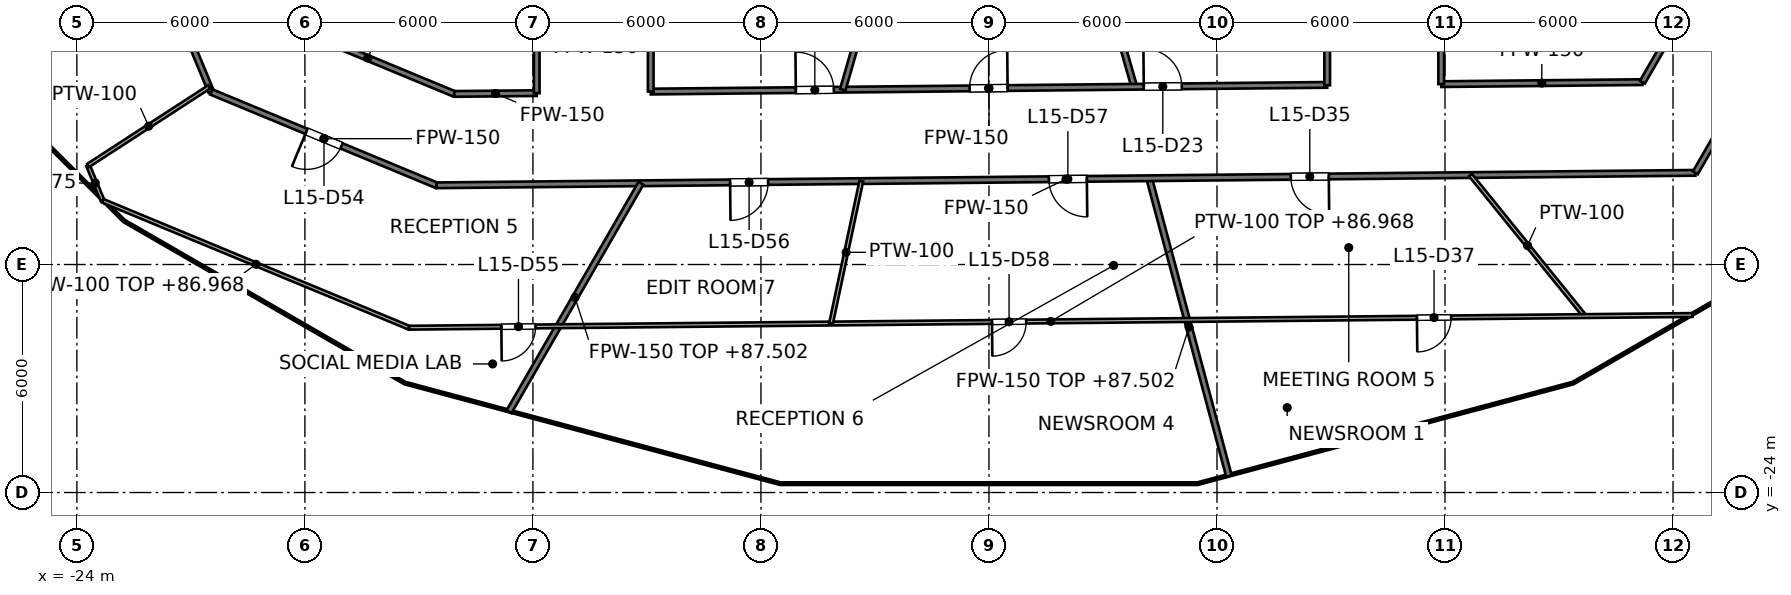
"""IFC4 building model, lengths in metres.
Left out: names, types, materials, properties, quantities, classifications, styles, units other than length and angle.
Written with IfcOpenShell. Run it as: python <this file> out.ifc"""

import sys

from ifc_helpers import new_model, si_unit, direction, frame, frame_2d, origin, place, context, subcontext, project, spatial, rectangle, extrude, element, fill, save


model = new_model("IFC4")
c1 = context("Model", 3, precision=1e-05, world=origin(), true_north=direction((0.0, 1.0)))
c2 = subcontext(c1, "Body", "Model", "MODEL_VIEW")
j1 = project(units=[si_unit("LENGTHUNIT", "METRE"), si_unit("PLANEANGLEUNIT", "RADIAN")], contexts=[c1])
p1 = place(None, origin())
s1 = spatial("IfcSite", under=j1, at=p1, CompositionType="ELEMENT")
p2 = place(p1, origin())
s2 = spatial("IfcBuilding", under=s1, at=p2, CompositionType="ELEMENT")
p3 = place(p2, frame((0.0, 0.0, 84.0)))
s3 = spatial("IfcBuildingStorey", under=s2, at=p3, CompositionType="ELEMENT", Elevation=84.0)
p4 = place(p3, frame((4.215, -15.73, 0.0), z_axis=(0.0, 0.0, 1.0), x_axis=(0.258844392232, -0.96591903419, 0.0)))
e1 = element("IfcWall", 1, at=p4, inside=s3, PredefinedType="PARTITIONING", context=c2, shape_type="SweptSolid", body=[
    extrude(rectangle(XDim=8.112, YDim=0.15, at=frame_2d((4.056, 0.0))), origin(), (0.0, 0.0, 1.0), 3.502),
])
p5 = place(p3, frame((2.296, -8.0, 0.0), z_axis=(0.0, 0.0, 1.0), x_axis=(0.275935525478, -0.961176147113, 0.0)))
e2 = element("IfcWall", 2, at=p5, inside=s3, PredefinedType="PARTITIONING", context=c2, shape_type="SweptSolid", body=[
    extrude(rectangle(XDim=5.548, YDim=0.15, at=frame_2d((2.774, 0.0))), origin(), (0.0, 0.0, 1.0), 3.9),
])
p6 = place(p3, frame((-22.9, -7.572, 0.0), z_axis=(0.0, 0.0, 1.0), x_axis=(0.382367581622, -0.924010298928, 0.0)))
e3 = element("IfcWall", 3, at=p6, inside=s3, PredefinedType="PARTITIONING", context=c2, shape_type="SweptSolid", body=[
    extrude(rectangle(XDim=6.374, YDim=0.15, at=frame_2d((3.187, 0.0))), origin(), (0.0, 0.0, 1.0), 2.977),
])
p7 = place(p6, frame((2.6, 0.0, 0.0)))
e4 = element("IfcOpeningElement", 4, at=p7, cuts=e3, PredefinedType="OPENING", context=c2, shape_type="SweptSolid", body=[
    extrude(rectangle(XDim=1.0, YDim=2.1, at=frame_2d((0.5, 1.05))), frame((0.0, 0.075, 0.0), z_axis=(0.0, -1.0, 0.0), x_axis=(1.0, 0.0, 0.0)), (0.0, 0.0, 1.0), 0.15),
])
p8 = place(p3, frame((-20.46, -13.46, 0.0), z_axis=(0.0, 0.0, 1.0), x_axis=(0.923801547606, -0.382871650349, 0.0)))
e5 = element("IfcWall", 5, at=p8, inside=s3, PredefinedType="PARTITIONING", context=c2, shape_type="SweptSolid", body=[
    extrude(rectangle(XDim=6.415, YDim=0.15, at=frame_2d((3.208, 0.0))), origin(), (0.0, 0.0, 1.0), 2.968),
])
p9 = place(p8, frame((2.707, 0.0, 0.0)))
e6 = element("IfcOpeningElement", 6, at=p9, cuts=e5, PredefinedType="OPENING", context=c2, shape_type="SweptSolid", body=[
    extrude(rectangle(XDim=1.0, YDim=2.1, at=frame_2d((0.5, 1.05))), frame((0.0, 0.075, 0.0), z_axis=(0.0, -1.0, 0.0), x_axis=(1.0, 0.0, 0.0)), (0.0, 0.0, 1.0), 0.15),
])
p10 = place(p3, frame((-18.623, -11.623, 0.0), z_axis=(0.0, 0.0, 1.0), x_axis=(0.923791670587, -0.38289548098, 0.0)))
e7 = element("IfcWall", 7, at=p10, inside=s3, PredefinedType="PARTITIONING", context=c2, shape_type="SweptSolid", body=[
    extrude(rectangle(XDim=4.931, YDim=0.15, at=frame_2d((2.465, 0.0))), origin(), (0.0, 0.0, 1.0), 2.968),
])
p11 = place(p3, frame((-14.534, -15.916, 0.0), z_axis=(0.0, 0.0, 1.0), x_axis=(0.999950930262, 0.009906415532, 0.0)))
e8 = element("IfcWall", 8, at=p11, inside=s3, PredefinedType="PARTITIONING", context=c2, shape_type="SweptSolid", body=[
    extrude(rectangle(XDim=33.123, YDim=0.15, at=frame_2d((16.561, 0.0))), origin(), (0.0, 0.0, 1.0), 2.968),
])
p12 = place(p11, frame((22.477, 0.0, 0.0)))
e9 = element("IfcOpeningElement", 9, at=p12, cuts=e8, PredefinedType="OPENING", context=c2, shape_type="SweptSolid", body=[
    extrude(rectangle(XDim=1.0, YDim=2.1, at=frame_2d((0.5, 1.05))), frame((0.0, 0.075, 0.0), z_axis=(0.0, -1.0, 0.0), x_axis=(1.0, 0.0, 0.0)), (0.0, 0.0, 1.0), 0.15),
])
p13 = place(p11, frame((7.723, 0.0, 0.0)))
e10 = element("IfcOpeningElement", 10, at=p13, cuts=e8, PredefinedType="OPENING", context=c2, shape_type="SweptSolid", body=[
    extrude(rectangle(XDim=1.0, YDim=2.1, at=frame_2d((0.5, 1.05))), frame((0.0, 0.075, 0.0), z_axis=(0.0, -1.0, 0.0), x_axis=(1.0, 0.0, 0.0)), (0.0, 0.0, 1.0), 0.15),
])
p14 = place(p11, frame((16.111, 0.0, 0.0)))
e11 = element("IfcOpeningElement", 11, at=p14, cuts=e8, PredefinedType="OPENING", context=c2, shape_type="SweptSolid", body=[
    extrude(rectangle(XDim=1.0, YDim=2.1, at=frame_2d((0.5, 1.05))), frame((0.0, 0.075, 0.0), z_axis=(0.0, -1.0, 0.0), x_axis=(1.0, 0.0, 0.0)), (0.0, 0.0, 1.0), 0.15),
])
p15 = place(p3, frame((-14.068, -13.511, 0.0), z_axis=(0.0, 0.0, 1.0), x_axis=(0.999950911515, 0.009908307647, 0.0)))
e12 = element("IfcWall", 12, at=p15, inside=s3, PredefinedType="PARTITIONING", context=c2, shape_type="SweptSolid", body=[
    extrude(rectangle(XDim=2.168, YDim=0.15, at=frame_2d((1.084, 0.0))), origin(), (0.0, 0.0, 1.0), 2.968),
])
p16 = place(p3, frame((-8.9, -13.449, 0.0), z_axis=(0.0, 0.0, 1.0), x_axis=(0.999950834077, 0.009916119672, 0.0)))
e13 = element("IfcWall", 13, at=p16, inside=s3, PredefinedType="PARTITIONING", context=c2, shape_type="SweptSolid", body=[
    extrude(rectangle(XDim=17.801, YDim=0.15, at=frame_2d((8.9, 0.0))), origin(), (0.0, 0.0, 1.0), 2.968),
])
p17 = place(p16, frame((3.818, 0.0, 0.0)))
e14 = element("IfcOpeningElement", 14, at=p17, cuts=e13, PredefinedType="OPENING", context=c2, shape_type="SweptSolid", body=[
    extrude(rectangle(XDim=1.0, YDim=2.1, at=frame_2d((0.5, 1.05))), frame((0.0, 0.075, 0.0), z_axis=(0.0, -1.0, 0.0), x_axis=(1.0, 0.0, 0.0)), (0.0, 0.0, 1.0), 0.15),
])
p18 = place(p16, frame((8.391, 0.0, 0.0)))
e15 = element("IfcOpeningElement", 15, at=p18, cuts=e13, PredefinedType="OPENING", context=c2, shape_type="SweptSolid", body=[
    extrude(rectangle(XDim=1.0, YDim=2.1, at=frame_2d((0.5, 1.05))), frame((0.0, 0.075, 0.0), z_axis=(0.0, -1.0, 0.0), x_axis=(1.0, 0.0, 0.0)), (0.0, 0.0, 1.0), 0.15),
])
p19 = place(p16, frame((12.975, 0.0, 0.0)))
e16 = element("IfcOpeningElement", 16, at=p19, cuts=e13, PredefinedType="OPENING", context=c2, shape_type="SweptSolid", body=[
    extrude(rectangle(XDim=1.0, YDim=2.1, at=frame_2d((0.5, 1.05))), frame((0.0, 0.075, 0.0), z_axis=(0.0, -1.0, 0.0), x_axis=(1.0, 0.0, 0.0)), (0.0, 0.0, 1.0), 0.15),
])
p20 = place(p3, frame((11.9, -13.253, 0.0), z_axis=(0.0, 0.0, 1.0), x_axis=(0.999950853109, 0.009914200296, 0.0)))
e17 = element("IfcWall", 17, at=p20, inside=s3, PredefinedType="PARTITIONING", context=c2, shape_type="SweptSolid", body=[
    extrude(rectangle(XDim=5.294, YDim=0.15, at=frame_2d((2.647, 0.0))), origin(), (0.0, 0.0, 1.0), 2.968),
])
p21 = place(p3, frame((18.587, -15.587, 0.0), z_axis=(0.0, 0.0, 1.0), x_axis=(0.500026433136, 0.866010142069, 0.0)))
e18 = element("IfcWall", 18, at=p21, inside=s3, PredefinedType="PARTITIONING", context=c2, shape_type="SweptSolid", body=[
    extrude(rectangle(XDim=8.713, YDim=0.15, at=frame_2d((4.357, 0.0))), origin(), (0.0, 0.0, 1.0), 2.968),
])
p22 = place(p21, frame((3.807, 0.0, 0.0)))
e19 = element("IfcOpeningElement", 19, at=p22, cuts=e18, PredefinedType="OPENING", context=c2, shape_type="SweptSolid", body=[
    extrude(rectangle(XDim=1.0, YDim=2.1, at=frame_2d((0.5, 1.05))), frame((0.0, 0.075, 0.0), z_axis=(0.0, -1.0, 0.0), x_axis=(1.0, 0.0, 0.0)), (0.0, 0.0, 1.0), 0.15),
])
p23 = place(p3, frame((17.194, -13.201, 0.0), z_axis=(0.0, 0.0, 1.0), x_axis=(0.50001062018, 0.866019272134, 0.0)))
e20 = element("IfcWall", 20, at=p23, inside=s3, PredefinedType="PARTITIONING", context=c2, shape_type="SweptSolid", body=[
    extrude(rectangle(XDim=6.674, YDim=0.15, at=frame_2d((3.337, 0.0))), origin(), (0.0, 0.0, 1.0), 2.968),
])
p24 = place(p23, frame((2.833, 0.0, 0.0)))
e21 = element("IfcOpeningElement", 21, at=p24, cuts=e20, PredefinedType="OPENING", context=c2, shape_type="SweptSolid", body=[
    extrude(rectangle(XDim=1.0, YDim=2.1, at=frame_2d((0.5, 1.05))), frame((0.0, 0.075, 0.0), z_axis=(0.0, -1.0, 0.0), x_axis=(1.0, 0.0, 0.0)), (0.0, 0.0, 1.0), 0.15),
])
p25 = place(p3, frame((-12.629, -21.874, 0.0), z_axis=(0.0, 0.0, 1.0), x_axis=(0.499986326517, 0.86603329803, 0.0)))
e22 = element("IfcWall", 22, at=p25, inside=s3, PredefinedType="PARTITIONING", context=c2, shape_type="SweptSolid", body=[
    extrude(rectangle(XDim=6.941, YDim=0.15, at=frame_2d((3.471, 0.0))), origin(), (0.0, 0.0, 1.0), 3.502),
])
p26 = place(p3, frame((-3.846, -13.399, 0.0), z_axis=(0.0, 0.0, 1.0), x_axis=(0.275914969745, 0.961182048038, 0.0)))
e23 = element("IfcWall", 23, at=p26, inside=s3, PredefinedType="PARTITIONING", context=c2, shape_type="SweptSolid", body=[
    extrude(rectangle(XDim=5.617, YDim=0.15, at=frame_2d((2.809, 0.0))), origin(), (0.0, 0.0, 1.0), 3.9),
])
p27 = place(p3, frame((11.9, -13.253, 0.0), z_axis=(0.0, 0.0, 1.0), x_axis=(0.0, 1.0, 0.0)))
e24 = element("IfcWall", 24, at=p27, inside=s3, PredefinedType="PARTITIONING", context=c2, shape_type="SweptSolid", body=[
    extrude(rectangle(XDim=5.253, YDim=0.15, at=frame_2d((2.626, 0.0))), origin(), (0.0, 0.0, 1.0), 2.968),
])
p28 = place(p3, frame((8.9, -13.283, 0.0), z_axis=(0.0, 0.0, 1.0), x_axis=(0.0, 1.0, 0.0)))
e25 = element("IfcWall", 25, at=p28, inside=s3, PredefinedType="PARTITIONING", context=c2, shape_type="SweptSolid", body=[
    extrude(rectangle(XDim=5.283, YDim=0.15, at=frame_2d((2.642, 0.0))), origin(), (0.0, 0.0, 1.0), 2.968),
])
p29 = place(p3, frame((-8.9, -13.449, 0.0), z_axis=(0.0, 0.0, 1.0), x_axis=(0.0, 1.0, 0.0)))
e26 = element("IfcWall", 26, at=p29, inside=s3, PredefinedType="PARTITIONING", context=c2, shape_type="SweptSolid", body=[
    extrude(rectangle(XDim=5.449, YDim=0.15, at=frame_2d((2.725, 0.0))), origin(), (0.0, 0.0, 1.0), 2.968),
])
p30 = place(p3, frame((-11.9, -13.49, 0.0), z_axis=(0.0, 0.0, 1.0), x_axis=(0.0, 1.0, 0.0)))
e27 = element("IfcWall", 27, at=p30, inside=s3, PredefinedType="PARTITIONING", context=c2, shape_type="SweptSolid", body=[
    extrude(rectangle(XDim=5.49, YDim=0.15, at=frame_2d((2.745, 0.0))), origin(), (0.0, 0.0, 1.0), 2.968),
])
p31 = place(p30, frame((2.245, 0.0, 0.0)))
e28 = element("IfcOpeningElement", 28, at=p31, cuts=e27, PredefinedType="OPENING", context=c2, shape_type="SweptSolid", body=[
    extrude(rectangle(XDim=1.0, YDim=2.1, at=frame_2d((0.5, 1.05))), frame((0.0, 0.075, 0.0), z_axis=(0.0, -1.0, 0.0), x_axis=(1.0, 0.0, 0.0)), (0.0, 0.0, 1.0), 0.15),
])
p32 = place(p3, frame((-23.706, -15.395, 0.0), z_axis=(0.0, 0.0, 1.0), x_axis=(0.382734348683, -0.923858440638, 0.0)))
e29 = element("IfcWall", 29, at=p32, inside=s3, PredefinedType="PARTITIONING", context=c2, shape_type="SweptSolid", body=[
    extrude(rectangle(XDim=0.996, YDim=0.1, at=frame_2d((0.498, 0.0))), origin(), (0.0, 0.0, 1.0), 3.675),
])
p33 = place(p3, frame((12.67, -15.646, 0.0), z_axis=(0.0, 0.0, 1.0), x_axis=(0.629429152062, -0.777057875923, 0.0)))
e30 = element("IfcWall", 30, at=p33, inside=s3, PredefinedType="PARTITIONING", context=c2, shape_type="SweptSolid", body=[
    extrude(rectangle(XDim=4.774, YDim=0.1, at=frame_2d((2.387, 0.0))), origin(), (0.0, 0.0, 1.0), 3.9),
])
p34 = place(p3, frame((-23.315, -16.325, 0.0), z_axis=(0.0, 0.0, 1.0), x_axis=(0.923811686722, -0.382847185541, 0.0)))
e31 = element("IfcWall", 31, at=p34, inside=s3, PredefinedType="PARTITIONING", context=c2, shape_type="SweptSolid", body=[
    extrude(rectangle(XDim=8.719, YDim=0.1, at=frame_2d((4.36, 0.0))), origin(), (0.0, 0.0, 1.0), 2.968),
])
p35 = place(p3, frame((-15.26, -19.663, 0.0), z_axis=(0.0, 0.0, 1.0), x_axis=(0.999951032014, 0.009896139397, 0.0)))
e32 = element("IfcWall", 32, at=p35, inside=s3, PredefinedType="PARTITIONING", context=c2, shape_type="SweptSolid", body=[
    extrude(rectangle(XDim=33.774, YDim=0.1, at=frame_2d((16.887, 0.0))), origin(), (0.0, 0.0, 1.0), 2.968),
])
p36 = place(p35, frame((26.523, 0.0, 0.0)))
e33 = element("IfcOpeningElement", 33, at=p36, cuts=e32, PredefinedType="OPENING", context=c2, shape_type="SweptSolid", body=[
    extrude(rectangle(XDim=0.9, YDim=2.1, at=frame_2d((0.45, 1.05))), frame((0.0, 0.05, 0.0), z_axis=(0.0, -1.0, 0.0), x_axis=(1.0, 0.0, 0.0)), (0.0, 0.0, 1.0), 0.1),
])
p37 = place(p35, frame((2.43, 0.0, 0.0)))
e34 = element("IfcOpeningElement", 34, at=p37, cuts=e32, PredefinedType="OPENING", context=c2, shape_type="SweptSolid", body=[
    extrude(rectangle(XDim=0.9, YDim=2.1, at=frame_2d((0.45, 1.05))), frame((0.0, 0.05, 0.0), z_axis=(0.0, -1.0, 0.0), x_axis=(1.0, 0.0, 0.0)), (0.0, 0.0, 1.0), 0.1),
])
p38 = place(p35, frame((15.34, 0.0, 0.0)))
e35 = element("IfcOpeningElement", 35, at=p38, cuts=e32, PredefinedType="OPENING", context=c2, shape_type="SweptSolid", body=[
    extrude(rectangle(XDim=0.9, YDim=2.1, at=frame_2d((0.45, 1.05))), frame((0.0, 0.05, 0.0), z_axis=(0.0, -1.0, 0.0), x_axis=(1.0, 0.0, 0.0)), (0.0, 0.0, 1.0), 0.1),
])
p39 = place(p3, frame((-23.706, -15.395, 0.0), z_axis=(0.0, 0.0, 1.0), x_axis=(0.838733884708, 0.544541523341, 0.0)))
e36 = element("IfcWall", 36, at=p39, inside=s3, PredefinedType="PARTITIONING", context=c2, shape_type="SweptSolid", body=[
    extrude(rectangle(XDim=3.803, YDim=0.1, at=frame_2d((1.902, 0.0))), origin(), (0.0, 0.0, 1.0), 3.9),
])
p40 = place(p3, frame((-4.156, -19.553, 0.0), z_axis=(0.0, 0.0, 1.0), x_axis=(0.208023345905, 0.978123861052, 0.0)))
e37 = element("IfcWall", 37, at=p40, inside=s3, PredefinedType="PARTITIONING", context=c2, shape_type="SweptSolid", body=[
    extrude(rectangle(XDim=3.832, YDim=0.1, at=frame_2d((1.916, 0.0))), origin(), (0.0, 0.0, 1.0), 3.9),
])
p41 = place(p17, origin())
e38 = element("IfcDoor", 38, at=p41, inside=s3, OperationType="SINGLE_SWING_LEFT", PredefinedType="DOOR", context=c2, shape_type="SweptSolid", body=[
    extrude(rectangle(XDim=1.0, YDim=2.1, at=frame_2d((0.5, 1.05))), frame((0.0, 0.025, 0.0), z_axis=(0.0, -1.0, 0.0), x_axis=(1.0, 0.0, 0.0)), (0.0, 0.0, 1.0), 0.05),
])
fill(e14, e38)
p42 = place(p18, origin())
e39 = element("IfcDoor", 39, at=p42, inside=s3, OperationType="SINGLE_SWING_RIGHT", PredefinedType="DOOR", context=c2, shape_type="SweptSolid", body=[
    extrude(rectangle(XDim=1.0, YDim=2.1, at=frame_2d((0.5, 1.05))), frame((0.0, 0.025, 0.0), z_axis=(0.0, -1.0, 0.0), x_axis=(1.0, 0.0, 0.0)), (0.0, 0.0, 1.0), 0.05),
])
fill(e15, e39)
p43 = place(p19, origin())
e40 = element("IfcDoor", 40, at=p43, inside=s3, OperationType="SINGLE_SWING_LEFT", PredefinedType="DOOR", context=c2, shape_type="SweptSolid", body=[
    extrude(rectangle(XDim=1.0, YDim=2.1, at=frame_2d((0.5, 1.05))), frame((0.0, 0.025, 0.0), z_axis=(0.0, -1.0, 0.0), x_axis=(1.0, 0.0, 0.0)), (0.0, 0.0, 1.0), 0.05),
])
fill(e16, e40)
p44 = place(p12, origin())
e41 = element("IfcDoor", 41, at=p44, inside=s3, OperationType="SINGLE_SWING_RIGHT", PredefinedType="DOOR", context=c2, shape_type="SweptSolid", body=[
    extrude(rectangle(XDim=1.0, YDim=2.1, at=frame_2d((0.5, 1.05))), frame((0.0, 0.025, 0.0), z_axis=(0.0, -1.0, 0.0), x_axis=(1.0, 0.0, 0.0)), (0.0, 0.0, 1.0), 0.05),
])
fill(e9, e41)
p45 = place(p36, origin())
e42 = element("IfcDoor", 42, at=p45, inside=s3, OperationType="SINGLE_SWING_LEFT", PredefinedType="DOOR", context=c2, shape_type="SweptSolid", body=[
    extrude(rectangle(XDim=0.9, YDim=2.1, at=frame_2d((0.45, 1.05))), frame((0.0, 0.025, 0.0), z_axis=(0.0, -1.0, 0.0), x_axis=(1.0, 0.0, 0.0)), (0.0, 0.0, 1.0), 0.05),
])
fill(e33, e42)
p46 = place(p9, origin())
e43 = element("IfcDoor", 43, at=p46, inside=s3, OperationType="SINGLE_SWING_LEFT", PredefinedType="DOOR", context=c2, shape_type="SweptSolid", body=[
    extrude(rectangle(XDim=1.0, YDim=2.1, at=frame_2d((0.5, 1.05))), frame((0.0, 0.025, 0.0), z_axis=(0.0, -1.0, 0.0), x_axis=(1.0, 0.0, 0.0)), (0.0, 0.0, 1.0), 0.05),
])
fill(e6, e43)
p47 = place(p37, origin())
e44 = element("IfcDoor", 44, at=p47, inside=s3, OperationType="SINGLE_SWING_LEFT", PredefinedType="DOOR", context=c2, shape_type="SweptSolid", body=[
    extrude(rectangle(XDim=0.9, YDim=2.1, at=frame_2d((0.45, 1.05))), frame((0.0, 0.025, 0.0), z_axis=(0.0, -1.0, 0.0), x_axis=(1.0, 0.0, 0.0)), (0.0, 0.0, 1.0), 0.05),
])
fill(e34, e44)
p48 = place(p13, origin())
e45 = element("IfcDoor", 45, at=p48, inside=s3, OperationType="SINGLE_SWING_LEFT", PredefinedType="DOOR", context=c2, shape_type="SweptSolid", body=[
    extrude(rectangle(XDim=1.0, YDim=2.1, at=frame_2d((0.5, 1.05))), frame((0.0, 0.025, 0.0), z_axis=(0.0, -1.0, 0.0), x_axis=(1.0, 0.0, 0.0)), (0.0, 0.0, 1.0), 0.05),
])
fill(e10, e45)
p49 = place(p14, origin())
e46 = element("IfcDoor", 46, at=p49, inside=s3, OperationType="SINGLE_SWING_RIGHT", PredefinedType="DOOR", context=c2, shape_type="SweptSolid", body=[
    extrude(rectangle(XDim=1.0, YDim=2.1, at=frame_2d((0.5, 1.05))), frame((0.0, 0.025, 0.0), z_axis=(0.0, -1.0, 0.0), x_axis=(1.0, 0.0, 0.0)), (0.0, 0.0, 1.0), 0.05),
])
fill(e11, e46)
p50 = place(p38, origin())
e47 = element("IfcDoor", 47, at=p50, inside=s3, OperationType="SINGLE_SWING_LEFT", PredefinedType="DOOR", context=c2, shape_type="SweptSolid", body=[
    extrude(rectangle(XDim=0.9, YDim=2.1, at=frame_2d((0.45, 1.05))), frame((0.0, 0.025, 0.0), z_axis=(0.0, -1.0, 0.0), x_axis=(1.0, 0.0, 0.0)), (0.0, 0.0, 1.0), 0.05),
])
fill(e35, e47)
save(model, sys.argv[1])
